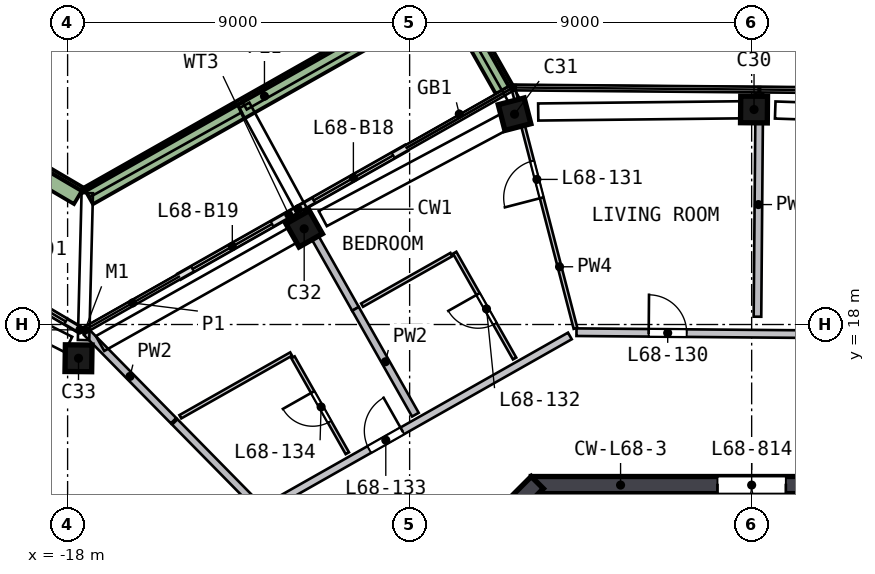
"""IFC4 building model, lengths in metres.
Left out: names, types, materials, properties, quantities, classifications, styles, units other than length and angle.
Written with IfcOpenShell. Run it as: python <this file> out.ifc"""

import sys

from ifc_helpers import new_model, si_unit, direction, frame, frame_2d, origin, origin_2d, place, context, subcontext, project, spatial, polyline, rectangle, outline, extrude, element, fill, save


model = new_model("IFC4")
c1 = context("Model", 3, precision=1e-05, world=origin(), true_north=direction((0.0, 1.0)))
c2 = subcontext(c1, "Body", "Model", "MODEL_VIEW")
j1 = project(units=[si_unit("LENGTHUNIT", "METRE"), si_unit("PLANEANGLEUNIT", "RADIAN")], contexts=[c1])
p1 = place(None, origin())
s1 = spatial("IfcSite", under=j1, at=p1, CompositionType="ELEMENT")
p2 = place(p1, origin())
s2 = spatial("IfcBuilding", under=s1, at=p2, CompositionType="ELEMENT")
p3 = place(p2, frame((0.0, 0.0, 277.5)))
s3 = spatial("IfcBuildingStorey", under=s2, at=p3, CompositionType="ELEMENT", Elevation=277.5)
p4 = place(p3, frame((0.198, 23.657, 0.0), z_axis=(-0.112551351, 0.0, 0.99364591), x_axis=(-0.993610589, 0.008431586, -0.11254735)))
e1 = element("IfcColumn", 1, at=p4, inside=s3, PredefinedType="COLUMN", context=c2, shape_type="SweptSolid", body=[
    extrude(rectangle(XDim=0.7, YDim=0.7, at=origin_2d()), origin(), (0.0, 0.0, 1.0), 3.21),
])
p5 = place(p3, frame((-6.104, 23.57, 0.0), z_axis=(-0.111825315, -0.029951852, 0.993276389), x_axis=(0.961604099, 0.248830254, 0.115762953)))
e2 = element("IfcColumn", 2, at=p5, inside=s3, PredefinedType="COLUMN", context=c2, shape_type="SweptSolid", body=[
    extrude(rectangle(XDim=0.7, YDim=0.7, at=origin_2d()), origin(), (0.0, 0.0, 1.0), 3.211),
])
p6 = place(p3, frame((-11.657, 20.587, 0.0), z_axis=(-0.097493601, -0.056275557, 0.993643829), x_axis=(-0.864752693, -0.4894198, -0.112565713)))
e3 = element("IfcColumn", 3, at=p6, inside=s3, PredefinedType="COLUMN", context=c2, shape_type="SweptSolid", body=[
    extrude(rectangle(XDim=0.7, YDim=0.7, at=origin_2d()), origin(), (0.0, 0.0, 1.0), 3.21),
])
p7 = place(p3, frame((-17.615, 17.214, 0.0), z_axis=(-0.081100673, -0.084445031, 0.993122207), x_axis=(0.996673479, -0.014909516, 0.080122924)))
e4 = element("IfcColumn", 4, at=p7, inside=s3, PredefinedType="COLUMN", context=c2, shape_type="SweptSolid", body=[
    extrude(rectangle(XDim=0.7, YDim=0.7, at=origin_2d()), origin(), (0.0, 0.0, 1.0), 3.212),
])
p8 = place(p3, frame((5.799, 13.775, 0.0), z_axis=(0.0, 0.0, 1.0), x_axis=(-1.0, 0.0, 0.0)))
e5 = element("IfcWall", 5, at=p8, inside=s3, PredefinedType="SHEAR", context=c2, shape_type="SweptSolid", body=[
    extrude(rectangle(XDim=11.598, YDim=0.45, at=frame_2d((5.799, 0.0))), origin(), (0.0, 0.0, 1.0), 3.5),
])
p9 = place(p8, frame((4.899, 0.0, 0.0)))
e6 = element("IfcOpeningElement", 6, at=p9, cuts=e5, PredefinedType="OPENING", context=c2, shape_type="SweptSolid", body=[
    extrude(rectangle(XDim=1.8, YDim=2.1, at=frame_2d((0.9, 1.05))), frame((0.0, 0.235, 0.0), z_axis=(0.0, -1.0, 0.0), x_axis=(1.0, 0.0, 0.0)), (0.0, 0.0, 1.0), 0.47),
])
p10 = place(p3, frame((-5.64, 13.841, 0.0), z_axis=(0.0, 0.0, 1.0), x_axis=(-0.707106781, -0.707106781, 0.0)))
e7 = element("IfcWall", 7, at=p10, inside=s3, PredefinedType="SHEAR", context=c2, shape_type="SweptSolid", body=[
    extrude(rectangle(XDim=11.598, YDim=0.45, at=frame_2d((5.799, 0.0))), origin(), (0.0, 0.0, 1.0), 3.5),
])
p11 = place(p3, frame((-17.707, 17.877, 0.0), z_axis=(0.0, 0.0, 1.0), x_axis=(-0.861824362, 0.507206831, 0.0)))
e8 = element("IfcWall", 8, at=p11, inside=s3, PredefinedType="SOLIDWALL", context=c2, shape_type="SweptSolid", body=[
    extrude(rectangle(XDim=3.2, YDim=0.15, at=frame_2d((1.6, 0.0))), origin(), (0.0, 0.0, 1.0), 2.525),
])
p12 = place(p11, frame((0.4, 0.0, 0.0)))
e9 = element("IfcOpeningElement", 9, at=p12, cuts=e8, PredefinedType="OPENING", context=c2, shape_type="SweptSolid", body=[
    extrude(rectangle(XDim=2.4, YDim=2.4, at=frame_2d((1.2, 1.2))), frame((0.0, 0.085, 0.0), z_axis=(0.0, -1.0, 0.0), x_axis=(1.0, 0.0, 0.0)), (0.0, 0.0, 1.0), 0.17),
])
p13 = place(p3, frame((-9.088, 22.645, 0.0), z_axis=(0.0, 0.0, 1.0), x_axis=(-0.870191834, -0.492713073, 0.0)))
e10 = element("IfcWall", 10, at=p13, inside=s3, PredefinedType="SOLIDWALL", context=c2, shape_type="SweptSolid", body=[
    extrude(rectangle(XDim=3.25, YDim=0.15, at=frame_2d((1.625, 0.0))), origin(), (0.0, 0.0, 1.0), 2.525),
])
p14 = place(p13, frame((0.4, 0.0, 0.0)))
e11 = element("IfcOpeningElement", 11, at=p14, cuts=e10, PredefinedType="OPENING", context=c2, shape_type="SweptSolid", body=[
    extrude(rectangle(XDim=2.4, YDim=2.4, at=frame_2d((1.2, 1.2))), frame((0.0, 0.085, 0.0), z_axis=(0.0, -1.0, 0.0), x_axis=(1.0, 0.0, 0.0)), (0.0, 0.0, 1.0), 0.17),
])
p15 = place(p3, frame((-11.916, 21.044, 0.0), z_axis=(0.0, 0.0, 1.0), x_axis=(-0.870199981, -0.492698684, 0.0)))
e12 = element("IfcWall", 12, at=p15, inside=s3, PredefinedType="SOLIDWALL", context=c2, shape_type="SweptSolid", body=[
    extrude(rectangle(XDim=3.611, YDim=0.15, at=frame_2d((1.806, 0.0))), origin(), (0.0, 0.0, 1.0), 2.525),
])
p16 = place(p15, frame((0.811, 0.0, 0.0)))
e13 = element("IfcOpeningElement", 13, at=p16, cuts=e12, PredefinedType="OPENING", context=c2, shape_type="SweptSolid", body=[
    extrude(rectangle(XDim=2.4, YDim=2.4, at=frame_2d((1.2, 1.2))), frame((0.0, 0.085, 0.0), z_axis=(0.0, -1.0, 0.0), x_axis=(1.0, 0.0, 0.0)), (0.0, 0.0, 1.0), 0.17),
])
p17 = place(p3, frame((-6.515, 24.19, 0.0), z_axis=(0.0, 0.0, 1.0), x_axis=(-0.492715997, 0.870190179, 0.0)))
e14 = element("IfcWall", 14, at=p17, inside=s3, PredefinedType="SOLIDWALL", context=c2, shape_type="SweptSolid", body=[
    extrude(rectangle(XDim=3.199, YDim=0.5, at=frame_2d((1.6, 0.0))), origin(), (0.0, 0.0, 1.0), 0.7),
])
p18 = place(p3, frame((-8.185, 26.633, 0.0), z_axis=(0.0, 0.0, 1.0), x_axis=(-0.870181396, -0.492731507, 0.0)))
e15 = element("IfcWall", 15, at=p18, inside=s3, PredefinedType="SOLIDWALL", context=c2, shape_type="SweptSolid", body=[
    extrude(rectangle(XDim=10.652, YDim=0.5, at=frame_2d((5.326, 0.0))), origin(), (0.0, 0.0, 1.0), 0.7),
])
p19 = place(p3, frame((-17.705, 21.386, 0.0), z_axis=(0.0, 0.0, 1.0), x_axis=(-0.861810432, 0.507230499, 0.0)))
e16 = element("IfcWall", 16, at=p19, inside=s3, PredefinedType="SOLIDWALL", context=c2, shape_type="SweptSolid", body=[
    extrude(rectangle(XDim=6.441, YDim=0.5, at=frame_2d((3.22, 0.0))), origin(), (0.0, 0.0, 1.0), 0.7),
])
p20 = place(p3, origin())
e17 = element("IfcWall", 17, at=p20, inside=s3, PredefinedType="SOLIDWALL", context=c2, shape_type="SweptSolid", body=[
    extrude(outline(polyline([(-3.9, 13.55), (-1.2, 13.55), (-1.2, 9.9), (-1.4, 9.9), (-1.4, 12.9), (-3.7, 12.9), (-3.7, 9.9), (-3.9, 9.9), (-3.9, 13.55)])), origin(), (0.0, 0.0, 1.0), 3.19),
])
p21 = place(p3, frame((-12.717, 13.207, 0.0), z_axis=(0.0, 0.0, 1.0), x_axis=(0.870186015, 0.492723349, 0.0)))
e18 = element("IfcWall", 18, at=p21, inside=s3, PredefinedType="SOLIDWALL", context=c2, shape_type="SweptSolid", body=[
    extrude(rectangle(XDim=9.116, YDim=0.2, at=frame_2d((4.558, 0.0))), origin(), (0.0, 0.0, 1.0), 3.19),
])
p22 = place(p21, frame((3.05, 0.0, 0.0)))
e19 = element("IfcOpeningElement", 19, at=p22, cuts=e18, PredefinedType="OPENING", context=c2, shape_type="SweptSolid", body=[
    extrude(rectangle(XDim=1.0, YDim=2.1, at=frame_2d((0.5, 1.05))), frame((0.0, 0.11, 0.0), z_axis=(0.0, -1.0, 0.0), x_axis=(1.0, 0.0, 0.0)), (0.0, 0.0, 1.0), 0.22),
])
p23 = place(p3, frame((-4.609, 17.798, 0.0), z_axis=(0.0, 0.0, 1.0), x_axis=(0.999964836, -0.008386109, 0.0)))
e20 = element("IfcWall", 20, at=p23, inside=s3, PredefinedType="SOLIDWALL", context=c2, shape_type="SweptSolid", body=[
    extrude(rectangle(XDim=9.316, YDim=0.2, at=frame_2d((4.658, 0.0))), origin(), (0.0, 0.0, 1.0), 3.19),
])
p24 = place(p23, frame((1.9, 0.0, 0.0)))
e21 = element("IfcOpeningElement", 21, at=p24, cuts=e20, PredefinedType="OPENING", context=c2, shape_type="SweptSolid", body=[
    extrude(rectangle(XDim=1.0, YDim=2.1, at=frame_2d((0.5, 1.05))), frame((0.0, 0.11, 0.0), z_axis=(0.0, -1.0, 0.0), x_axis=(1.0, 0.0, 0.0)), (0.0, 0.0, 1.0), 0.22),
])
p25 = place(p3, frame((-23.481, 15.82, 0.0), z_axis=(0.0, 0.0, 1.0), x_axis=(0.861807473, -0.507235526, 0.0)))
e22 = element("IfcWall", 22, at=p25, inside=s3, PredefinedType="SOLIDWALL", context=c2, shape_type="SweptSolid", body=[
    extrude(rectangle(XDim=10.302, YDim=0.2, at=frame_2d((5.151, 0.0))), origin(), (0.0, 0.0, 1.0), 3.19),
])
p26 = place(p25, frame((2.5, 0.0, 0.0)))
e23 = element("IfcOpeningElement", 23, at=p26, cuts=e22, PredefinedType="OPENING", context=c2, shape_type="SweptSolid", body=[
    extrude(rectangle(XDim=1.0, YDim=2.1, at=frame_2d((0.5, 1.05))), frame((0.0, 0.11, 0.0), z_axis=(0.0, -1.0, 0.0), x_axis=(1.0, 0.0, 0.0)), (0.0, 0.0, 1.0), 0.22),
])
p27 = place(p3, frame((-17.504, 17.8, 0.0), z_axis=(0.0, 0.0, 1.0), x_axis=(0.70118172, -0.712982605, 0.0)))
e24 = element("IfcWall", 24, at=p27, inside=s3, PredefinedType="SOLIDWALL", context=c2, shape_type="SweptSolid", body=[
    extrude(rectangle(XDim=3.269, YDim=0.2, at=frame_2d((1.634, 0.0))), origin(), (0.0, 0.0, 1.0), 3.19),
])
p28 = place(p3, frame((-15.18, 15.436, 0.0), z_axis=(0.0, 0.0, 1.0), x_axis=(0.70117398, -0.712990217, 0.0)))
e25 = element("IfcWall", 25, at=p28, inside=s3, PredefinedType="SOLIDWALL", context=c2, shape_type="SweptSolid", body=[
    extrude(rectangle(XDim=3.161, YDim=0.2, at=frame_2d((1.581, 0.0))), origin(), (0.0, 0.0, 1.0), 3.19),
])
p29 = place(p3, frame((-10.425, 18.412, 0.0), z_axis=(0.0, 0.0, 1.0), x_axis=(-0.49273066, 0.870181876, 0.0)))
e26 = element("IfcWall", 26, at=p29, inside=s3, PredefinedType="SOLIDWALL", context=c2, shape_type="SweptSolid", body=[
    extrude(rectangle(XDim=2.95, YDim=0.2, at=frame_2d((1.475, 0.0))), origin(), (0.0, 0.0, 1.0), 3.19),
])
p30 = place(p3, frame((-8.849, 15.627, 0.0), z_axis=(0.0, 0.0, 1.0), x_axis=(-0.492700695, 0.870198842, 0.0)))
e27 = element("IfcWall", 27, at=p30, inside=s3, PredefinedType="SOLIDWALL", context=c2, shape_type="SweptSolid", body=[
    extrude(rectangle(XDim=3.2, YDim=0.2, at=frame_2d((1.6, 0.0))), origin(), (0.0, 0.0, 1.0), 3.19),
])
p31 = place(p3, frame((0.153, 18.205, 0.0), z_axis=(0.0, 0.0, 1.0), x_axis=(0.008355102, 0.999965096, 0.0)))
e28 = element("IfcWall", 28, at=p31, inside=s3, PredefinedType="SOLIDWALL", context=c2, shape_type="SweptSolid", body=[
    extrude(rectangle(XDim=5.903, YDim=0.2, at=frame_2d((2.951, 0.0))), origin(), (0.0, 0.0, 1.0), 3.19),
])
p32 = place(p3, frame((-15.033, 15.573, 0.0), z_axis=(0.0, 0.0, 1.0), x_axis=(0.87016489, 0.492760656, 0.0)))
e29 = element("IfcWall", 29, at=p32, inside=s3, PredefinedType="PARTITIONING", context=c2, shape_type="SweptSolid", body=[
    extrude(rectangle(XDim=3.35, YDim=0.1, at=frame_2d((1.675, 0.0))), origin(), (0.0, 0.0, 1.0), 3.19),
])
p33 = place(p3, frame((-10.64, 14.613, 0.0), z_axis=(0.0, 0.0, 1.0), x_axis=(-0.492717305, 0.870189438, 0.0)))
e30 = element("IfcWall", 30, at=p33, inside=s3, PredefinedType="PARTITIONING", context=c2, shape_type="SweptSolid", body=[
    extrude(rectangle(XDim=2.9, YDim=0.1, at=frame_2d((1.45, 0.0))), origin(), (0.0, 0.0, 1.0), 3.19),
])
p34 = place(p33, frame((0.95, 0.0, 0.0)))
e31 = element("IfcOpeningElement", 31, at=p34, cuts=e30, PredefinedType="OPENING", context=c2, shape_type="SweptSolid", body=[
    extrude(rectangle(XDim=0.9, YDim=2.1, at=frame_2d((0.45, 1.05))), frame((0.0, 0.06, 0.0), z_axis=(0.0, -1.0, 0.0), x_axis=(1.0, 0.0, 0.0)), (0.0, 0.0, 1.0), 0.12),
])
p35 = place(p3, frame((-7.902, 19.841, 0.0), z_axis=(0.0, 0.0, 1.0), x_axis=(-0.870178583, -0.492736475, 0.0)))
e32 = element("IfcWall", 32, at=p35, inside=s3, PredefinedType="PARTITIONING", context=c2, shape_type="SweptSolid", body=[
    extrude(rectangle(XDim=2.7, YDim=0.1, at=frame_2d((1.35, 0.0))), origin(), (0.0, 0.0, 1.0), 3.19),
])
p36 = place(p3, frame((-6.238, 17.105, 0.0), z_axis=(0.0, 0.0, 1.0), x_axis=(-0.492700695, 0.870198842, 0.0)))
e33 = element("IfcWall", 33, at=p36, inside=s3, PredefinedType="PARTITIONING", context=c2, shape_type="SweptSolid", body=[
    extrude(rectangle(XDim=3.2, YDim=0.1, at=frame_2d((1.6, 0.0))), origin(), (0.0, 0.0, 1.0), 3.19),
])
p37 = place(p36, frame((1.05, 0.0, 0.0)))
e34 = element("IfcOpeningElement", 34, at=p37, cuts=e33, PredefinedType="OPENING", context=c2, shape_type="SweptSolid", body=[
    extrude(rectangle(XDim=0.9, YDim=2.1, at=frame_2d((0.45, 1.05))), frame((0.0, 0.06, 0.0), z_axis=(0.0, -1.0, 0.0), x_axis=(1.0, 0.0, 0.0)), (0.0, 0.0, 1.0), 0.12),
])
p38 = place(p3, frame((-4.635, 17.898, 0.0), z_axis=(0.0, 0.0, 1.0), x_axis=(-0.250705712, 0.968063348, 0.0)))
e35 = element("IfcWall", 35, at=p38, inside=s3, PredefinedType="PARTITIONING", context=c2, shape_type="SweptSolid", body=[
    extrude(rectangle(XDim=6.476, YDim=0.1, at=frame_2d((3.238, 0.0))), origin(), (0.0, 0.0, 1.0), 3.19),
])
p39 = place(p38, frame((3.55, 0.0, 0.0)))
e36 = element("IfcOpeningElement", 36, at=p39, cuts=e35, PredefinedType="OPENING", context=c2, shape_type="SweptSolid", body=[
    extrude(rectangle(XDim=1.0, YDim=2.1, at=frame_2d((0.5, 1.05))), frame((0.0, 0.06, 0.0), z_axis=(0.0, -1.0, 0.0), x_axis=(1.0, 0.0, 0.0)), (0.0, 0.0, 1.0), 0.12),
])
p40 = place(p12, origin())
e37 = element("IfcDoor", 37, at=p40, inside=s3, OperationType="SLIDING_TO_LEFT", PredefinedType="DOOR", context=c2, shape_type="SweptSolid", body=[
    extrude(rectangle(XDim=2.4, YDim=2.4, at=frame_2d((1.2, 1.2))), frame((0.0, 0.025, 0.0), z_axis=(0.0, -1.0, 0.0), x_axis=(1.0, 0.0, 0.0)), (0.0, 0.0, 1.0), 0.05),
])
fill(e9, e37)
p41 = place(p14, origin())
e38 = element("IfcDoor", 38, at=p41, inside=s3, OperationType="SLIDING_TO_RIGHT", PredefinedType="DOOR", context=c2, shape_type="SweptSolid", body=[
    extrude(rectangle(XDim=2.4, YDim=2.4, at=frame_2d((1.2, 1.2))), frame((0.0, 0.025, 0.0), z_axis=(0.0, -1.0, 0.0), x_axis=(1.0, 0.0, 0.0)), (0.0, 0.0, 1.0), 0.05),
])
fill(e11, e38)
p42 = place(p16, origin())
e39 = element("IfcDoor", 39, at=p42, inside=s3, OperationType="SLIDING_TO_LEFT", PredefinedType="DOOR", context=c2, shape_type="SweptSolid", body=[
    extrude(rectangle(XDim=2.4, YDim=2.4, at=frame_2d((1.2, 1.2))), frame((0.0, 0.025, 0.0), z_axis=(0.0, -1.0, 0.0), x_axis=(1.0, 0.0, 0.0)), (0.0, 0.0, 1.0), 0.05),
])
fill(e13, e39)
p43 = place(p9, origin())
e40 = element("IfcDoor", 40, at=p43, inside=s3, OperationType="DOUBLE_DOOR_SINGLE_SWING", PredefinedType="DOOR", context=c2, shape_type="SweptSolid", body=[
    extrude(rectangle(XDim=1.8, YDim=2.1, at=frame_2d((0.9, 1.05))), frame((0.0, 0.025, 0.0), z_axis=(0.0, -1.0, 0.0), x_axis=(1.0, 0.0, 0.0)), (0.0, 0.0, 1.0), 0.05),
])
fill(e6, e40)
p44 = place(p24, origin())
e41 = element("IfcDoor", 41, at=p44, inside=s3, OperationType="SINGLE_SWING_LEFT", PredefinedType="DOOR", context=c2, shape_type="SweptSolid", body=[
    extrude(rectangle(XDim=1.0, YDim=2.1, at=frame_2d((0.5, 1.05))), frame((0.0, 0.025, 0.0), z_axis=(0.0, -1.0, 0.0), x_axis=(1.0, 0.0, 0.0)), (0.0, 0.0, 1.0), 0.05),
])
fill(e21, e41)
p45 = place(p39, origin())
e42 = element("IfcDoor", 42, at=p45, inside=s3, OperationType="SINGLE_SWING_LEFT", PredefinedType="DOOR", context=c2, shape_type="SweptSolid", body=[
    extrude(rectangle(XDim=1.0, YDim=2.1, at=frame_2d((0.5, 1.05))), frame((0.0, 0.025, 0.0), z_axis=(0.0, -1.0, 0.0), x_axis=(1.0, 0.0, 0.0)), (0.0, 0.0, 1.0), 0.05),
])
fill(e36, e42)
p46 = place(p37, origin())
e43 = element("IfcDoor", 43, at=p46, inside=s3, OperationType="SINGLE_SWING_RIGHT", PredefinedType="DOOR", context=c2, shape_type="SweptSolid", body=[
    extrude(rectangle(XDim=0.9, YDim=2.1, at=frame_2d((0.45, 1.05))), frame((0.0, 0.025, 0.0), z_axis=(0.0, -1.0, 0.0), x_axis=(1.0, 0.0, 0.0)), (0.0, 0.0, 1.0), 0.05),
])
fill(e34, e43)
p47 = place(p22, origin())
e44 = element("IfcDoor", 44, at=p47, inside=s3, OperationType="SINGLE_SWING_RIGHT", PredefinedType="DOOR", context=c2, shape_type="SweptSolid", body=[
    extrude(rectangle(XDim=1.0, YDim=2.1, at=frame_2d((0.5, 1.05))), frame((0.0, 0.025, 0.0), z_axis=(0.0, -1.0, 0.0), x_axis=(1.0, 0.0, 0.0)), (0.0, 0.0, 1.0), 0.05),
])
fill(e19, e44)
p48 = place(p34, origin())
e45 = element("IfcDoor", 45, at=p48, inside=s3, OperationType="SINGLE_SWING_RIGHT", PredefinedType="DOOR", context=c2, shape_type="SweptSolid", body=[
    extrude(rectangle(XDim=0.9, YDim=2.1, at=frame_2d((0.45, 1.05))), frame((0.0, 0.025, 0.0), z_axis=(0.0, -1.0, 0.0), x_axis=(1.0, 0.0, 0.0)), (0.0, 0.0, 1.0), 0.05),
])
fill(e31, e45)
save(model, sys.argv[1])
